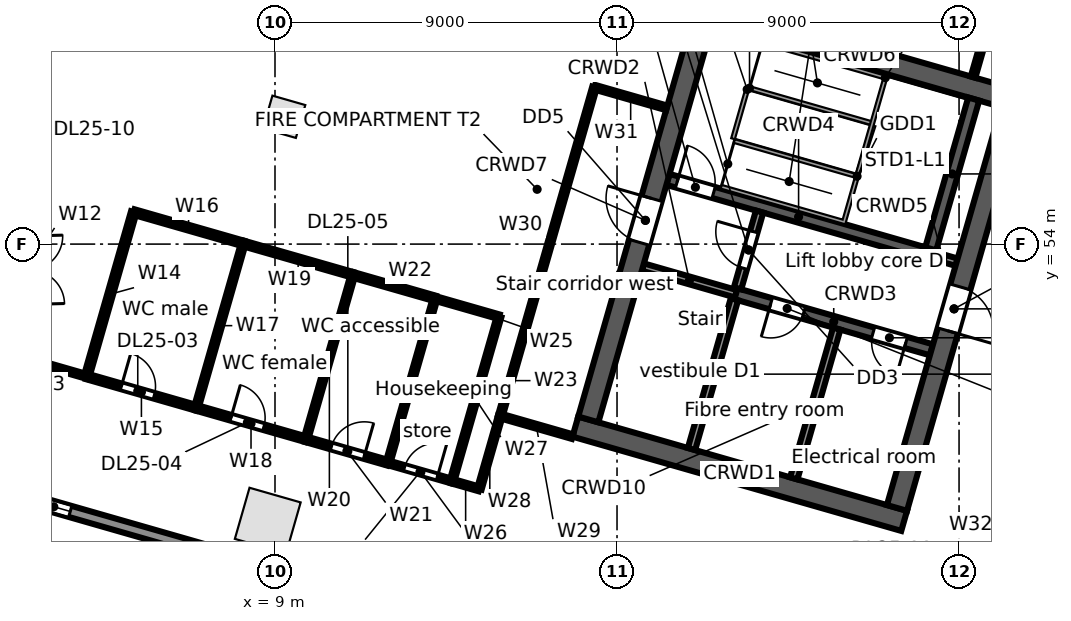
"""IFC4 building model, lengths in metres.
Left out: names, types, materials, properties, quantities, classifications, styles, units other than length and angle.
Written with IfcOpenShell. Run it as: python <this file> out.ifc"""

import sys

from ifc_helpers import new_model, si_unit, direction, frame, frame_2d, origin, origin_2d, place, context, subcontext, project, spatial, rectangle, extrude, element, fill, save


model = new_model("IFC4")
c1 = context("Model", 3, precision=1e-05, world=origin(), true_north=direction((0.0, 1.0)))
c2 = subcontext(c1, "Body", "Model", "MODEL_VIEW")
j1 = project(units=[si_unit("LENGTHUNIT", "METRE"), si_unit("PLANEANGLEUNIT", "RADIAN")], contexts=[c1])
p1 = place(None, origin())
s1 = spatial("IfcSite", under=j1, at=p1, CompositionType="ELEMENT")
p2 = place(p1, origin())
s2 = spatial("IfcBuilding", under=s1, at=p2, CompositionType="ELEMENT")
p3 = place(p2, frame((0.0, 0.0, 123.5)))
s3 = spatial("IfcBuildingStorey", under=s2, at=p3, CompositionType="ELEMENT", Elevation=123.5)
p4 = place(p3, frame((8.81, 46.722, 0.0), z_axis=(0.0, 0.0, 1.0), x_axis=(0.961261695938, -0.275637355817, 0.0)))
e1 = element("IfcColumn", 1, at=p4, inside=s3, PredefinedType="COLUMN", context=c2, shape_type="SweptSolid", body=[
    extrude(rectangle(XDim=1.4, YDim=1.4, at=origin_2d()), origin(), (0.0, 0.0, 1.0), 4.4),
])
p5 = place(p3, frame((9.241, 57.35, 0.0), z_axis=(0.0, 0.0, 1.0), x_axis=(0.961261695938, -0.275637355817, 0.0)))
e2 = element("IfcColumn", 2, at=p5, inside=s3, PredefinedType="COLUMN", context=c2, shape_type="SweptSolid", body=[
    extrude(rectangle(XDim=0.9, YDim=0.9, at=origin_2d()), origin(), (0.0, 0.0, 1.0), 4.4),
])
p6 = place(p3, frame((25.398, 40.717, 0.0), z_axis=(0.0, 0.0, 1.0), x_axis=(-0.961262423262, 0.275634819324, 0.0)))
e3 = element("IfcWall", 3, at=p6, inside=s3, PredefinedType="STANDARD", context=c2, shape_type="SweptSolid", body=[
    extrude(rectangle(XDim=26.359, YDim=0.3, at=frame_2d((13.179, 0.0))), origin(), (0.0, 0.0, 1.0), 4.08),
])
p7 = place(p6, frame((22.664, 0.0, 0.6)))
e4 = element("IfcOpeningElement", 4, at=p7, cuts=e3, PredefinedType="OPENING", context=c2, shape_type="SweptSolid", body=[
    extrude(rectangle(XDim=0.9, YDim=2.8, at=frame_2d((0.45, 1.4))), frame((0.0, 0.16, 0.0), z_axis=(0.0, -1.0, 0.0), x_axis=(1.0, 0.0, 0.0)), (0.0, 0.0, 1.0), 0.32),
])
p8 = place(p6, frame((13.844, 0.0, 0.6)))
e5 = element("IfcOpeningElement", 5, at=p8, cuts=e3, PredefinedType="OPENING", context=c2, shape_type="SweptSolid", body=[
    extrude(rectangle(XDim=0.9, YDim=2.8, at=frame_2d((0.45, 1.4))), frame((0.0, 0.16, 0.0), z_axis=(0.0, -1.0, 0.0), x_axis=(1.0, 0.0, 0.0)), (0.0, 0.0, 1.0), 0.32),
])
p9 = place(p6, frame((5.023, 0.0, 0.6)))
e6 = element("IfcOpeningElement", 6, at=p9, cuts=e3, PredefinedType="OPENING", context=c2, shape_type="SweptSolid", body=[
    extrude(rectangle(XDim=0.9, YDim=2.8, at=frame_2d((0.45, 1.4))), frame((0.0, 0.16, 0.0), z_axis=(0.0, -1.0, 0.0), x_axis=(1.0, 0.0, 0.0)), (0.0, 0.0, 1.0), 0.32),
])
p10 = place(p3, frame((16.904, 49.197, 0.0), z_axis=(0.0, 0.0, 1.0), x_axis=(0.96126248289, -0.275634611374, 0.0)))
e7 = element("IfcWall", 7, at=p10, inside=s3, PredefinedType="SOLIDWALL", context=c2, shape_type="SweptSolid", body=[
    extrude(rectangle(XDim=9.0, YDim=0.55, at=frame_2d((4.5, 0.0))), origin(), (0.0, 0.0, 1.0), 4.08),
])
p11 = place(p3, frame((18.68, 53.396, 0.0), z_axis=(0.0, 0.0, 1.0), x_axis=(0.961234387647, -0.275732573349, 0.0)))
e8 = element("IfcWall", 8, at=p11, inside=s3, PredefinedType="SOLIDWALL", context=c2, shape_type="SweptSolid", body=[
    extrude(rectangle(XDim=2.55, YDim=0.2, at=frame_2d((1.275, 0.0))), origin(), (0.0, 0.0, 1.0), 4.08),
])
p12 = place(p3, frame((21.131, 52.692, 0.0), z_axis=(0.0, 0.0, 1.0), x_axis=(0.961265220997, -0.27562506218, 0.0)))
e9 = element("IfcWall", 9, at=p12, inside=s3, PredefinedType="SOLIDWALL", context=c2, shape_type="SweptSolid", body=[
    extrude(rectangle(XDim=5.35, YDim=0.3, at=frame_2d((2.675, 0.0))), origin(), (0.0, 0.0, 1.0), 4.08),
])
p13 = place(p12, frame((0.95, 0.0, 0.0)))
e10 = element("IfcOpeningElement", 10, at=p13, cuts=e9, PredefinedType="OPENING", context=c2, shape_type="SweptSolid", body=[
    extrude(rectangle(XDim=0.9, YDim=2.1, at=frame_2d((0.45, 1.05))), frame((0.0, 0.16, 0.0), z_axis=(0.0, -1.0, 0.0), x_axis=(1.0, 0.0, 0.0)), (0.0, 0.0, 1.0), 0.32),
])
p14 = place(p12, frame((3.75, 0.0, 0.0)))
e11 = element("IfcOpeningElement", 11, at=p14, cuts=e9, PredefinedType="OPENING", context=c2, shape_type="SweptSolid", body=[
    extrude(rectangle(XDim=0.9, YDim=2.1, at=frame_2d((0.45, 1.05))), frame((0.0, 0.16, 0.0), z_axis=(0.0, -1.0, 0.0), x_axis=(1.0, 0.0, 0.0)), (0.0, 0.0, 1.0), 0.32),
])
p15 = place(p3, frame((19.341, 55.702, 0.0), z_axis=(0.0, 0.0, 1.0), x_axis=(0.961263228157, -0.27563201228, 0.0)))
e12 = element("IfcWall", 12, at=p15, inside=s3, PredefinedType="SOLIDWALL", context=c2, shape_type="SweptSolid", body=[
    extrude(rectangle(XDim=7.15, YDim=0.3, at=frame_2d((3.575, 0.0))), origin(), (0.0, 0.0, 1.0), 4.08),
])
p16 = place(p15, frame((0.25, 0.0, 0.0)))
e13 = element("IfcOpeningElement", 13, at=p16, cuts=e12, PredefinedType="OPENING", context=c2, shape_type="SweptSolid", body=[
    extrude(rectangle(XDim=1.0, YDim=2.1, at=frame_2d((0.5, 1.05))), frame((0.0, 0.16, 0.0), z_axis=(0.0, -1.0, 0.0), x_axis=(1.0, 0.0, 0.0)), (0.0, 0.0, 1.0), 0.32),
])
p17 = place(p3, frame((26.214, 53.732, 0.0), z_axis=(0.0, 0.0, 1.0), x_axis=(0.961240918172, -0.275709806194, 0.0)))
e14 = element("IfcWall", 14, at=p17, inside=s3, PredefinedType="SOLIDWALL", context=c2, shape_type="SweptSolid", body=[
    extrude(rectangle(XDim=0.75, YDim=0.2, at=frame_2d((0.375, 0.0))), origin(), (0.0, 0.0, 1.0), 4.08),
])
p18 = place(p3, frame((20.06, 60.204, 0.0), z_axis=(0.0, 0.0, 1.0), x_axis=(0.96126248289, -0.275634611374, 0.0)))
e15 = element("IfcWall", 15, at=p18, inside=s3, PredefinedType="SOLIDWALL", context=c2, shape_type="SweptSolid", body=[
    extrude(rectangle(XDim=9.0, YDim=0.55, at=frame_2d((4.5, 0.0))), origin(), (0.0, 0.0, 1.0), 4.08),
])
p19 = place(p3, frame((17.244, 49.386, 0.0), z_axis=(0.0, 0.0, 1.0), x_axis=(0.275632146085, 0.96126318979, 0.0)))
e16 = element("IfcWall", 16, at=p19, inside=s3, PredefinedType="SOLIDWALL", context=c2, shape_type="SweptSolid", body=[
    extrude(rectangle(XDim=10.9, YDim=0.55, at=frame_2d((5.45, 0.0))), origin(), (0.0, 0.0, 1.0), 4.08),
])
p20 = place(p19, frame((4.85, 0.0, 0.0)))
e17 = element("IfcOpeningElement", 17, at=p20, cuts=e16, PredefinedType="OPENING", context=c2, shape_type="SweptSolid", body=[
    extrude(rectangle(XDim=1.2, YDim=2.1, at=frame_2d((0.6, 1.05))), frame((0.0, 0.285, 0.0), z_axis=(0.0, -1.0, 0.0), x_axis=(1.0, 0.0, 0.0)), (0.0, 0.0, 1.0), 0.57),
])
p21 = place(p3, frame((19.959, 48.607, 0.0), z_axis=(0.0, 0.0, 1.0), x_axis=(0.275641165445, 0.961260603537, 0.0)))
e18 = element("IfcWall", 18, at=p21, inside=s3, PredefinedType="SOLIDWALL", context=c2, shape_type="SweptSolid", body=[
    extrude(rectangle(XDim=4.1, YDim=0.2, at=frame_2d((2.05, 0.0))), origin(), (0.0, 0.0, 1.0), 4.08),
])
p22 = place(p3, frame((21.172, 52.837, 0.0), z_axis=(0.0, 0.0, 1.0), x_axis=(0.275657676022, 0.961255868981, 0.0)))
e19 = element("IfcWall", 19, at=p22, inside=s3, PredefinedType="PARTITIONING", context=c2, shape_type="SweptSolid", body=[
    extrude(rectangle(XDim=2.1, YDim=0.2, at=frame_2d((1.05, 0.0))), origin(), (0.0, 0.0, 1.0), 4.08),
])
p23 = place(p22, frame((0.55, 0.0, 0.0)))
e20 = element("IfcOpeningElement", 20, at=p23, cuts=e19, PredefinedType="OPENING", context=c2, shape_type="SweptSolid", body=[
    extrude(rectangle(XDim=1.0, YDim=2.1, at=frame_2d((0.5, 1.05))), frame((0.0, 0.11, 0.0), z_axis=(0.0, -1.0, 0.0), x_axis=(1.0, 0.0, 0.0)), (0.0, 0.0, 1.0), 0.22),
])
p24 = place(p3, frame((22.651, 47.835, 0.0), z_axis=(0.0, 0.0, 1.0), x_axis=(0.275625388668, 0.961265127383, 0.0)))
e21 = element("IfcWall", 21, at=p24, inside=s3, PredefinedType="PARTITIONING", context=c2, shape_type="SweptSolid", body=[
    extrude(rectangle(XDim=4.1, YDim=0.2, at=frame_2d((2.05, 0.0))), origin(), (0.0, 0.0, 1.0), 4.08),
])
p25 = place(p3, frame((26.256, 53.876, 0.0), z_axis=(0.0, 0.0, 1.0), x_axis=(0.275641165445, 0.961260603537, 0.0)))
e22 = element("IfcWall", 22, at=p25, inside=s3, PredefinedType="SOLIDWALL", context=c2, shape_type="SweptSolid", body=[
    extrude(rectangle(XDim=4.1, YDim=0.3, at=frame_2d((2.05, 0.0))), origin(), (0.0, 0.0, 1.0), 4.08),
])
p26 = place(p3, frame((25.366, 47.057, 0.0), z_axis=(0.0, 0.0, 1.0), x_axis=(0.275632146085, 0.96126318979, 0.0)))
e23 = element("IfcWall", 23, at=p26, inside=s3, PredefinedType="SOLIDWALL", context=c2, shape_type="SweptSolid", body=[
    extrude(rectangle(XDim=10.9, YDim=0.55, at=frame_2d((5.45, 0.0))), origin(), (0.0, 0.0, 1.0), 4.08),
])
p27 = place(p26, frame((4.85, 0.0, 0.0)))
e24 = element("IfcOpeningElement", 24, at=p27, cuts=e23, PredefinedType="OPENING", context=c2, shape_type="SweptSolid", body=[
    extrude(rectangle(XDim=1.2, YDim=2.1, at=frame_2d((0.6, 1.05))), frame((0.0, 0.285, 0.0), z_axis=(0.0, -1.0, 0.0), x_axis=(1.0, 0.0, 0.0)), (0.0, 0.0, 1.0), 0.57),
])
p28 = place(p3, frame((2.601, 50.932, 0.0), z_axis=(0.0, 0.0, 1.0), x_axis=(0.961197773994, -0.27586018065, 0.0)))
e25 = element("IfcWall", 25, at=p28, inside=s3, PredefinedType="PARTITIONING", context=c2, shape_type="SweptSolid", body=[
    extrude(rectangle(XDim=1.5, YDim=0.125, at=frame_2d((0.75, 0.0))), origin(), (0.0, 0.0, 1.0), 4.08),
])
p29 = place(p3, frame((4.043, 50.518, 0.0), z_axis=(0.0, 0.0, 1.0), x_axis=(0.275745553681, 0.96123066411, 0.0)))
e26 = element("IfcWall", 26, at=p29, inside=s3, PredefinedType="PARTITIONING", context=c2, shape_type="SweptSolid", body=[
    extrude(rectangle(XDim=4.5, YDim=0.15, at=frame_2d((2.25, 0.0))), origin(), (0.0, 0.0, 1.0), 4.08),
])
p30 = place(p3, frame((4.043, 50.518, 0.0), z_axis=(0.0, 0.0, 1.0), x_axis=(0.961247103494, -0.275688240636, 0.0)))
e27 = element("IfcWall", 27, at=p30, inside=s3, PredefinedType="PARTITIONING", context=c2, shape_type="SweptSolid", body=[
    extrude(rectangle(XDim=3.0, YDim=0.15, at=frame_2d((1.5, 0.0))), origin(), (0.0, 0.0, 1.0), 4.08),
])
p31 = place(p30, frame((0.95, 0.0, 0.0)))
e28 = element("IfcOpeningElement", 28, at=p31, cuts=e27, PredefinedType="OPENING", context=c2, shape_type="SweptSolid", body=[
    extrude(rectangle(XDim=0.9, YDim=2.1, at=frame_2d((0.45, 1.05))), frame((0.0, 0.085, 0.0), z_axis=(0.0, -1.0, 0.0), x_axis=(1.0, 0.0, 0.0)), (0.0, 0.0, 1.0), 0.17),
])
p32 = place(p3, frame((5.284, 54.844, 0.0), z_axis=(0.0, 0.0, 1.0), x_axis=(0.961243927922, -0.275699312717, 0.0)))
e29 = element("IfcWall", 29, at=p32, inside=s3, PredefinedType="PARTITIONING", context=c2, shape_type="SweptSolid", body=[
    extrude(rectangle(XDim=2.999, YDim=0.15, at=frame_2d((1.5, 0.0))), origin(), (0.0, 0.0, 1.0), 4.08),
])
p33 = place(p3, frame((6.927, 49.691, 0.0), z_axis=(0.0, 0.0, 1.0), x_axis=(0.275530671241, 0.961292280841, 0.0)))
e30 = element("IfcWall", 30, at=p33, inside=s3, PredefinedType="PARTITIONING", context=c2, shape_type="SweptSolid", body=[
    extrude(rectangle(XDim=4.5, YDim=0.125, at=frame_2d((2.25, 0.0))), origin(), (0.0, 0.0, 1.0), 4.08),
])
p34 = place(p3, frame((6.927, 49.691, 0.0), z_axis=(0.0, 0.0, 1.0), x_axis=(0.961268664977, -0.27561305073, 0.0)))
e31 = element("IfcWall", 31, at=p34, inside=s3, PredefinedType="PARTITIONING", context=c2, shape_type="SweptSolid", body=[
    extrude(rectangle(XDim=3.0, YDim=0.15, at=frame_2d((1.5, 0.0))), origin(), (0.0, 0.0, 1.0), 3.142),
])
p35 = place(p34, frame((0.95, 0.0, 0.0)))
e32 = element("IfcOpeningElement", 32, at=p35, cuts=e31, PredefinedType="OPENING", context=c2, shape_type="SweptSolid", body=[
    extrude(rectangle(XDim=0.9, YDim=2.1, at=frame_2d((0.45, 1.05))), frame((0.0, 0.085, 0.0), z_axis=(0.0, -1.0, 0.0), x_axis=(1.0, 0.0, 0.0)), (0.0, 0.0, 1.0), 0.17),
])
p36 = place(p3, frame((8.167, 54.017, 0.0), z_axis=(0.0, 0.0, 1.0), x_axis=(0.961247103494, -0.275688240636, 0.0)))
e33 = element("IfcWall", 33, at=p36, inside=s3, PredefinedType="PARTITIONING", context=c2, shape_type="SweptSolid", body=[
    extrude(rectangle(XDim=3.0, YDim=0.15, at=frame_2d((1.5, 0.0))), origin(), (0.0, 0.0, 1.0), 3.142),
])
p37 = place(p3, frame((9.811, 48.864, 0.0), z_axis=(0.0, 0.0, 1.0), x_axis=(0.275545040649, 0.96128816209, 0.0)))
e34 = element("IfcWall", 34, at=p37, inside=s3, PredefinedType="PARTITIONING", context=c2, shape_type="SweptSolid", body=[
    extrude(rectangle(XDim=4.5, YDim=0.125, at=frame_2d((2.25, 0.0))), origin(), (0.0, 0.0, 1.0), 4.08),
])
p38 = place(p3, frame((9.811, 48.864, 0.0), z_axis=(0.0, 0.0, 1.0), x_axis=(0.961236680145, -0.275724581318, 0.0)))
e35 = element("IfcWall", 35, at=p38, inside=s3, PredefinedType="PARTITIONING", context=c2, shape_type="SweptSolid", body=[
    extrude(rectangle(XDim=2.249, YDim=0.15, at=frame_2d((1.125, 0.0))), origin(), (0.0, 0.0, 1.0), 4.08),
])
p39 = place(p38, frame((0.7, 0.0, 0.0)))
e36 = element("IfcOpeningElement", 36, at=p39, cuts=e35, PredefinedType="OPENING", context=c2, shape_type="SweptSolid", body=[
    extrude(rectangle(XDim=0.9, YDim=2.1, at=frame_2d((0.45, 1.05))), frame((0.0, 0.085, 0.0), z_axis=(0.0, -1.0, 0.0), x_axis=(1.0, 0.0, 0.0)), (0.0, 0.0, 1.0), 0.17),
])
p40 = place(p3, frame((11.051, 53.19, 0.0), z_axis=(0.0, 0.0, 1.0), x_axis=(0.961306648438, -0.275480539547, 0.0)))
e37 = element("IfcWall", 37, at=p40, inside=s3, PredefinedType="PARTITIONING", context=c2, shape_type="SweptSolid", body=[
    extrude(rectangle(XDim=2.25, YDim=0.15, at=frame_2d((1.125, 0.0))), origin(), (0.0, 0.0, 1.0), 4.08),
])
p41 = place(p3, frame((11.973, 48.244, 0.0), z_axis=(0.0, 0.0, 1.0), x_axis=(0.275781295989, 0.961220410095, 0.0)))
e38 = element("IfcWall", 38, at=p41, inside=s3, PredefinedType="PARTITIONING", context=c2, shape_type="SweptSolid", body=[
    extrude(rectangle(XDim=4.501, YDim=0.125, at=frame_2d((2.25, 0.0))), origin(), (0.0, 0.0, 1.0), 4.08),
])
p42 = place(p3, frame((11.973, 48.244, 0.0), z_axis=(0.0, 0.0, 1.0), x_axis=(0.96136592135, -0.275273618907, 0.0)))
e39 = element("IfcWall", 39, at=p42, inside=s3, PredefinedType="PARTITIONING", context=c2, shape_type="SweptSolid", body=[
    extrude(rectangle(XDim=1.751, YDim=0.125, at=frame_2d((0.875, 0.0))), origin(), (0.0, 0.0, 1.0), 4.08),
])
p43 = place(p42, frame((0.45, 0.0, 0.0)))
e40 = element("IfcOpeningElement", 40, at=p43, cuts=e39, PredefinedType="OPENING", context=c2, shape_type="SweptSolid", body=[
    extrude(rectangle(XDim=0.9, YDim=2.1, at=frame_2d((0.45, 1.05))), frame((0.0, 0.073, 0.0), z_axis=(0.0, -1.0, 0.0), x_axis=(1.0, 0.0, 0.0)), (0.0, 0.0, 1.0), 0.145),
])
p44 = place(p3, frame((13.214, 52.57, 0.0), z_axis=(0.0, 0.0, 1.0), x_axis=(0.961276075309, -0.275587204055, 0.0)))
e41 = element("IfcWall", 41, at=p44, inside=s3, PredefinedType="PARTITIONING", context=c2, shape_type="SweptSolid", body=[
    extrude(rectangle(XDim=1.75, YDim=0.125, at=frame_2d((0.875, 0.0))), origin(), (0.0, 0.0, 1.0), 4.08),
])
p45 = place(p3, frame((13.656, 47.762, 0.0), z_axis=(0.0, 0.0, 1.0), x_axis=(0.961154610169, -0.276010534854, 0.0)))
e42 = element("IfcWall", 42, at=p45, inside=s3, PredefinedType="PARTITIONING", context=c2, shape_type="SweptSolid", body=[
    extrude(rectangle(XDim=0.75, YDim=0.125, at=frame_2d((0.375, 0.0))), origin(), (0.0, 0.0, 1.0), 4.08),
])
p46 = place(p3, frame((13.656, 47.762, 0.0), z_axis=(0.0, 0.0, 1.0), x_axis=(0.275545040649, 0.96128816209, 0.0)))
e43 = element("IfcWall", 43, at=p46, inside=s3, PredefinedType="PARTITIONING", context=c2, shape_type="SweptSolid", body=[
    extrude(rectangle(XDim=4.5, YDim=0.125, at=frame_2d((2.25, 0.0))), origin(), (0.0, 0.0, 1.0), 4.08),
])
p47 = place(p3, frame((14.377, 47.555, 0.0), z_axis=(0.0, 0.0, 1.0), x_axis=(0.275446387355, 0.961316434736, 0.0)))
e44 = element("IfcWall", 44, at=p47, inside=s3, PredefinedType="PARTITIONING", context=c2, shape_type="SweptSolid", body=[
    extrude(rectangle(XDim=2.0, YDim=0.125, at=frame_2d((1.0, 0.0))), origin(), (0.0, 0.0, 1.0), 4.08),
])
p48 = place(p3, frame((14.928, 49.478, 0.0), z_axis=(0.0, 0.0, 1.0), x_axis=(0.961243778232, -0.27569983462, 0.0)))
e45 = element("IfcWall", 45, at=p48, inside=s3, PredefinedType="PARTITIONING", context=c2, shape_type="SweptSolid", body=[
    extrude(rectangle(XDim=1.977, YDim=0.125, at=frame_2d((0.988, 0.0))), origin(), (0.0, 0.0, 1.0), 4.08),
])
p49 = place(p3, frame((14.928, 49.478, 0.0), z_axis=(0.0, 0.0, 1.0), x_axis=(0.275674053528, 0.961251172281, 0.0)))
e46 = element("IfcWall", 46, at=p49, inside=s3, PredefinedType="PARTITIONING", context=c2, shape_type="SweptSolid", body=[
    extrude(rectangle(XDim=9.0, YDim=0.125, at=frame_2d((4.5, 0.0))), origin(), (0.0, 0.0, 1.0), 3.142),
])
p50 = place(p3, frame((17.409, 58.129, 0.0), z_axis=(0.0, 0.0, 1.0), x_axis=(0.961253165474, -0.275667103345, 0.0)))
e47 = element("IfcWall", 47, at=p50, inside=s3, PredefinedType="PARTITIONING", context=c2, shape_type="SweptSolid", body=[
    extrude(rectangle(XDim=1.977, YDim=0.125, at=frame_2d((0.988, 0.0))), origin(), (0.0, 0.0, 1.0), 4.08),
])
p51 = place(p3, frame((26.373, 42.206, 0.0), z_axis=(0.0, 0.0, 1.0), x_axis=(0.52987567935, 0.848075329457, 0.0)))
e48 = element("IfcWall", 48, at=p51, inside=s3, PredefinedType="PARTITIONING", context=c2, shape_type="SweptSolid", body=[
    extrude(rectangle(XDim=6.232, YDim=0.25, at=frame_2d((3.116, 0.0))), origin(), (0.0, 0.0, 1.0), 4.08),
])
p52 = place(p51, frame((2.2, 0.0, 0.0)))
e49 = element("IfcOpeningElement", 49, at=p52, cuts=e48, PredefinedType="OPENING", context=c2, shape_type="SweptSolid", body=[
    extrude(rectangle(XDim=1.8, YDim=2.1, at=frame_2d((0.9, 1.05))), frame((0.0, 0.135, 0.0), z_axis=(0.0, -1.0, 0.0), x_axis=(1.0, 0.0, 0.0)), (0.0, 0.0, 1.0), 0.27),
])
p53 = place(p3, frame((27.368, 58.394, 0.0), z_axis=(0.0, 0.0, 1.0), x_axis=(0.276295387056, 0.961072764722, 0.0)))
e50 = element("IfcWall", 50, at=p53, inside=s3, PredefinedType="PARTITIONING", context=c2, shape_type="SweptSolid", body=[
    extrude(rectangle(XDim=5.386, YDim=0.125, at=frame_2d((2.693, 0.0))), origin(), (0.0, 0.0, 1.0), 3.142),
])
p54 = place(p7, origin())
e51 = element("IfcWindow", 51, at=p54, inside=s3, PartitioningType="SINGLE_PANEL", PredefinedType="WINDOW", context=c2, shape_type="SweptSolid", body=[
    extrude(rectangle(XDim=0.9, YDim=2.8, at=frame_2d((0.45, 1.4))), frame((0.0, 0.03, 0.0), z_axis=(0.0, -1.0, 0.0), x_axis=(1.0, 0.0, 0.0)), (0.0, 0.0, 1.0), 0.06),
])
fill(e4, e51)
p55 = place(p16, origin())
e52 = element("IfcDoor", 52, at=p55, inside=s3, OperationType="SINGLE_SWING_LEFT", PredefinedType="DOOR", context=c2, shape_type="SweptSolid", body=[
    extrude(rectangle(XDim=1.0, YDim=2.1, at=frame_2d((0.5, 1.05))), frame((0.0, 0.025, 0.0), z_axis=(0.0, -1.0, 0.0), x_axis=(1.0, 0.0, 0.0)), (0.0, 0.0, 1.0), 0.05),
])
fill(e13, e52)
p56 = place(p23, origin())
e53 = element("IfcDoor", 53, at=p56, inside=s3, OperationType="SINGLE_SWING_RIGHT", PredefinedType="DOOR", context=c2, shape_type="SweptSolid", body=[
    extrude(rectangle(XDim=1.0, YDim=2.1, at=frame_2d((0.5, 1.05))), frame((0.0, 0.025, 0.0), z_axis=(0.0, -1.0, 0.0), x_axis=(1.0, 0.0, 0.0)), (0.0, 0.0, 1.0), 0.05),
])
fill(e20, e53)
p57 = place(p20, origin())
e54 = element("IfcDoor", 54, at=p57, inside=s3, OperationType="SINGLE_SWING_RIGHT", PredefinedType="DOOR", context=c2, shape_type="SweptSolid", body=[
    extrude(rectangle(XDim=1.2, YDim=2.1, at=frame_2d((0.6, 1.05))), frame((0.0, 0.025, 0.0), z_axis=(0.0, -1.0, 0.0), x_axis=(1.0, 0.0, 0.0)), (0.0, 0.0, 1.0), 0.05),
])
fill(e17, e54)
p58 = place(p27, frame((1.2, 0.0, 0.0), z_axis=(0.0, 0.0, 1.0), x_axis=(-1.0, 0.0, 0.0)))
e55 = element("IfcDoor", 55, at=p58, inside=s3, OperationType="SINGLE_SWING_RIGHT", PredefinedType="DOOR", context=c2, shape_type="SweptSolid", body=[
    extrude(rectangle(XDim=1.2, YDim=2.1, at=frame_2d((0.6, 1.05))), frame((0.0, 0.025, 0.0), z_axis=(0.0, -1.0, 0.0), x_axis=(1.0, 0.0, 0.0)), (0.0, 0.0, 1.0), 0.05),
])
fill(e24, e55)
p59 = place(p13, frame((0.9, 0.0, 0.0), z_axis=(0.0, 0.0, 1.0), x_axis=(-1.0, 0.0, 0.0)))
e56 = element("IfcDoor", 56, at=p59, inside=s3, OperationType="SINGLE_SWING_RIGHT", PredefinedType="DOOR", context=c2, shape_type="SweptSolid", body=[
    extrude(rectangle(XDim=0.9, YDim=2.1, at=frame_2d((0.45, 1.05))), frame((0.0, 0.025, 0.0), z_axis=(0.0, -1.0, 0.0), x_axis=(1.0, 0.0, 0.0)), (0.0, 0.0, 1.0), 0.05),
])
fill(e10, e56)
p60 = place(p14, frame((0.9, 0.0, 0.0), z_axis=(0.0, 0.0, 1.0), x_axis=(-1.0, 0.0, 0.0)))
e57 = element("IfcDoor", 57, at=p60, inside=s3, OperationType="SINGLE_SWING_LEFT", PredefinedType="DOOR", context=c2, shape_type="SweptSolid", body=[
    extrude(rectangle(XDim=0.9, YDim=2.1, at=frame_2d((0.45, 1.05))), frame((0.0, 0.025, 0.0), z_axis=(0.0, -1.0, 0.0), x_axis=(1.0, 0.0, 0.0)), (0.0, 0.0, 1.0), 0.05),
])
fill(e11, e57)
p61 = place(p31, origin())
e58 = element("IfcDoor", 58, at=p61, inside=s3, OperationType="SINGLE_SWING_LEFT", PredefinedType="DOOR", context=c2, shape_type="SweptSolid", body=[
    extrude(rectangle(XDim=0.9, YDim=2.1, at=frame_2d((0.45, 1.05))), frame((0.0, 0.025, 0.0), z_axis=(0.0, -1.0, 0.0), x_axis=(1.0, 0.0, 0.0)), (0.0, 0.0, 1.0), 0.05),
])
fill(e28, e58)
p62 = place(p35, origin())
e59 = element("IfcDoor", 59, at=p62, inside=s3, OperationType="SINGLE_SWING_LEFT", PredefinedType="DOOR", context=c2, shape_type="SweptSolid", body=[
    extrude(rectangle(XDim=0.9, YDim=2.1, at=frame_2d((0.45, 1.05))), frame((0.0, 0.025, 0.0), z_axis=(0.0, -1.0, 0.0), x_axis=(1.0, 0.0, 0.0)), (0.0, 0.0, 1.0), 0.05),
])
fill(e32, e59)
p63 = place(p39, origin())
e60 = element("IfcDoor", 60, at=p63, inside=s3, OperationType="SINGLE_SWING_RIGHT", PredefinedType="DOOR", context=c2, shape_type="SweptSolid", body=[
    extrude(rectangle(XDim=0.9, YDim=2.1, at=frame_2d((0.45, 1.05))), frame((0.0, 0.025, 0.0), z_axis=(0.0, -1.0, 0.0), x_axis=(1.0, 0.0, 0.0)), (0.0, 0.0, 1.0), 0.05),
])
fill(e36, e60)
p64 = place(p43, origin())
e61 = element("IfcDoor", 61, at=p64, inside=s3, OperationType="SINGLE_SWING_RIGHT", PredefinedType="DOOR", context=c2, shape_type="SweptSolid", body=[
    extrude(rectangle(XDim=0.9, YDim=2.1, at=frame_2d((0.45, 1.05))), frame((0.0, 0.025, 0.0), z_axis=(0.0, -1.0, 0.0), x_axis=(1.0, 0.0, 0.0)), (0.0, 0.0, 1.0), 0.05),
])
fill(e40, e61)
save(model, sys.argv[1])
